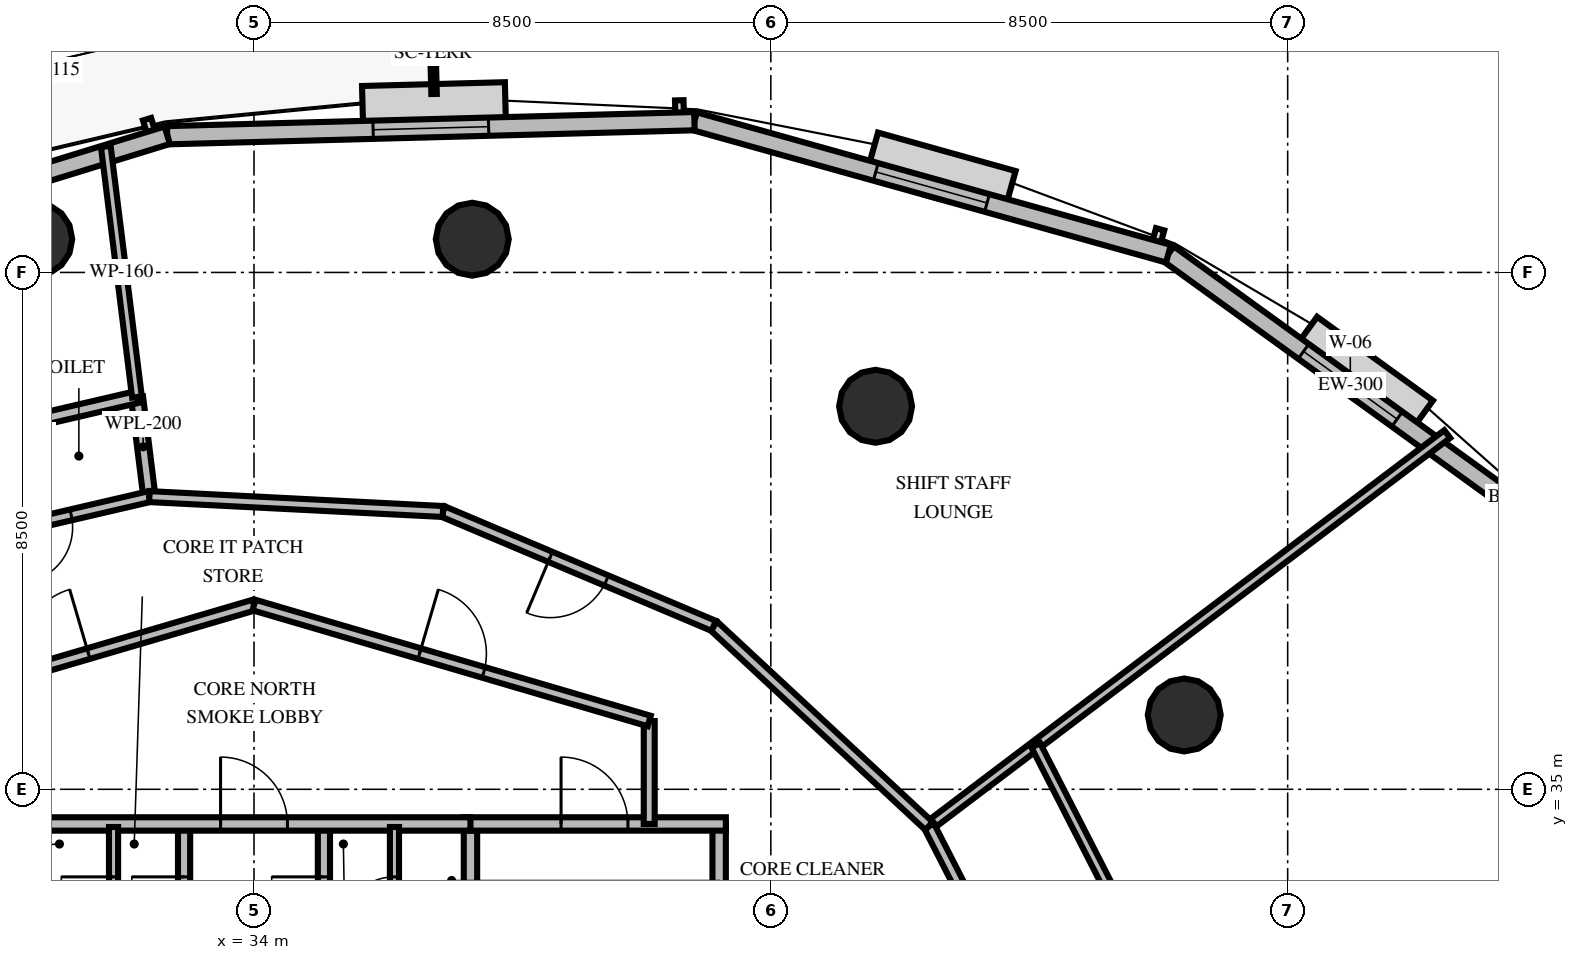
"""IFC4 building model, lengths in metres.
Left out: names, types, materials, properties, quantities, classifications, styles, units other than length and angle.
Written with IfcOpenShell. Run it as: python <this file> out.ifc"""

import sys

from ifc_helpers import new_model, si_unit, direction, frame, frame_2d, origin, origin_2d, place, context, subcontext, project, spatial, rectangle, circle, extrude, element, fill, save


model = new_model("IFC4")
c1 = context("Model", 3, precision=1e-05, world=origin(), true_north=direction((0.0, 1.0)))
c2 = subcontext(c1, "Body", "Model", "MODEL_VIEW")
j1 = project(units=[si_unit("LENGTHUNIT", "METRE"), si_unit("PLANEANGLEUNIT", "RADIAN")], contexts=[c1])
p1 = place(None, origin())
s1 = spatial("IfcSite", under=j1, at=p1, CompositionType="ELEMENT")
p2 = place(p1, origin())
s2 = spatial("IfcBuilding", under=s1, at=p2, CompositionType="ELEMENT")
p3 = place(p2, frame((0.0, 0.0, 105.8)))
s3 = spatial("IfcBuildingStorey", under=s2, at=p3, CompositionType="ELEMENT", Elevation=105.8)
for number, where, z_axis, x_axis in (
    (1, (49.299, 36.222, 0.0), (0.0, 0.0, 1.0), (1.0, 0.0, 0.0)),
    (2, (44.222, 41.299, 0.0), (0.0, 0.0, 1.0), (1.0, 0.0, 0.0)),
    (3, (37.59, 44.046, 0.0), (0.0, 0.0, 1.0), (1.0, 0.0, 0.0)),
    (4, (30.41, 44.046, 0.0), (0.0, 0.0, 1.0), (1.0, 0.0, 0.0)),
):
    element("IfcColumn", number, at=place(p3, frame(where, z_axis=z_axis, x_axis=x_axis)), inside=s3, PredefinedType="COLUMN", context=c2, shape_type="SweptSolid", body=[
        extrude(circle(Radius=0.6, at=origin_2d()), origin(), (0.0, 0.0, 1.0), 4.0),
    ])
p4 = place(p3, frame((55.021, 39.481, 0.0), z_axis=(0.0, 0.0, 1.0), x_axis=(-0.810233431566, 0.586107316431, 0.0)))
e5 = element("IfcWall", 5, at=p4, inside=s3, PredefinedType="SOLIDWALL", context=c2, shape_type="SweptSolid", body=[
    extrude(rectangle(XDim=7.383, YDim=0.3, at=frame_2d((3.692, 0.0))), origin(), (0.0, 0.0, 1.0), 2.9),
])
p5 = place(p4, frame((2.742, 0.0, 0.8)))
e6 = element("IfcOpeningElement", 6, at=p5, cuts=e5, PredefinedType="OPENING", context=c2, shape_type="SweptSolid", body=[
    extrude(rectangle(XDim=1.9, YDim=1.95, at=frame_2d((0.95, 0.975))), frame((0.0, 0.16, 0.0), z_axis=(0.0, -1.0, 0.0), x_axis=(1.0, 0.0, 0.0)), (0.0, 0.0, 1.0), 0.32),
])
p6 = place(p3, frame((49.039, 43.808, 0.0), z_axis=(0.0, 0.0, 1.0), x_axis=(-0.963083265721, 0.269203683645, 0.0)))
e7 = element("IfcWall", 7, at=p6, inside=s3, PredefinedType="SOLIDWALL", context=c2, shape_type="SweptSolid", body=[
    extrude(rectangle(XDim=8.095, YDim=0.3, at=frame_2d((4.047, 0.0))), origin(), (0.0, 0.0, 1.0), 2.9),
])
p7 = place(p6, frame((3.098, 0.0, 0.8)))
e8 = element("IfcOpeningElement", 8, at=p7, cuts=e7, PredefinedType="OPENING", context=c2, shape_type="SweptSolid", body=[
    extrude(rectangle(XDim=1.9, YDim=1.95, at=frame_2d((0.95, 0.975))), frame((0.0, 0.16, 0.0), z_axis=(0.0, -1.0, 0.0), x_axis=(1.0, 0.0, 0.0)), (0.0, 0.0, 1.0), 0.32),
])
p8 = place(p3, frame((41.243, 45.987, 0.0), z_axis=(0.0, 0.0, 1.0), x_axis=(-0.99964462396, -0.026657565299, 0.0)))
e9 = element("IfcWall", 9, at=p8, inside=s3, PredefinedType="SOLIDWALL", context=c2, shape_type="SweptSolid", body=[
    extrude(rectangle(XDim=8.673, YDim=0.3, at=frame_2d((4.336, 0.0))), origin(), (0.0, 0.0, 1.0), 2.9),
])
p9 = place(p8, frame((3.386, 0.0, 0.8)))
e10 = element("IfcOpeningElement", 10, at=p9, cuts=e9, PredefinedType="OPENING", context=c2, shape_type="SweptSolid", body=[
    extrude(rectangle(XDim=1.9, YDim=1.95, at=frame_2d((0.95, 0.975))), frame((0.0, 0.16, 0.0), z_axis=(0.0, -1.0, 0.0), x_axis=(1.0, 0.0, 0.0)), (0.0, 0.0, 1.0), 0.32),
])
p10 = place(p3, frame((32.573, 45.756, 0.0), z_axis=(0.0, 0.0, 1.0), x_axis=(-0.95579325701, -0.294039537911, 0.0)))
e11 = element("IfcWall", 11, at=p10, inside=s3, PredefinedType="SOLIDWALL", context=c2, shape_type="SweptSolid", body=[
    extrude(rectangle(XDim=8.891, YDim=0.3, at=frame_2d((4.445, 0.0))), origin(), (0.0, 0.0, 1.0), 2.9),
])
p11 = place(p10, frame((5.71, 0.0, 0.0)))
e12 = element("IfcOpeningElement", 12, at=p11, cuts=e11, PredefinedType="OPENING", context=c2, shape_type="SweptSolid", body=[
    extrude(rectangle(XDim=1.05, YDim=2.15, at=frame_2d((0.525, 1.075))), frame((0.0, 0.16, 0.0), z_axis=(0.0, -1.0, 0.0), x_axis=(1.0, 0.0, 0.0)), (0.0, 0.0, 1.0), 0.32),
])
p12 = place(p3, frame((32.85, 30.05, 0.0), z_axis=(0.0, 0.0, 1.0), x_axis=(0.0, 1.0, 0.0)))
e13 = element("IfcWall", 13, at=p12, inside=s3, PredefinedType="SOLIDWALL", context=c2, shape_type="SweptSolid", body=[
    extrude(rectangle(XDim=4.38, YDim=0.2, at=frame_2d((2.19, 0.0))), origin(), (0.0, 0.0, 1.0), 2.8),
])
p13 = place(p12, frame((2.65, 0.0, 0.0)))
e14 = element("IfcOpeningElement", 14, at=p13, cuts=e13, PredefinedType="OPENING", context=c2, shape_type="SweptSolid", body=[
    extrude(rectangle(XDim=0.86, YDim=2.05, at=frame_2d((0.43, 1.025))), frame((0.0, 0.11, 0.0), z_axis=(0.0, -1.0, 0.0), x_axis=(1.0, 0.0, 0.0)), (0.0, 0.0, 1.0), 0.22),
])
p14 = place(p3, frame((37.56, 30.05, 0.0), z_axis=(0.0, 0.0, 1.0), x_axis=(0.0, 1.0, 0.0)))
e15 = element("IfcWall", 15, at=p14, inside=s3, PredefinedType="SOLIDWALL", context=c2, shape_type="SweptSolid", body=[
    extrude(rectangle(XDim=4.38, YDim=0.22, at=frame_2d((2.19, 0.0))), origin(), (0.0, 0.0, 1.0), 2.8),
])
p15 = place(p14, frame((0.8, 0.0, 0.0)))
e16 = element("IfcOpeningElement", 16, at=p15, cuts=e15, PredefinedType="OPENING", context=c2, shape_type="SweptSolid", body=[
    extrude(rectangle(XDim=1.05, YDim=2.1, at=frame_2d((0.525, 1.05))), frame((0.0, 0.12, 0.0), z_axis=(0.0, -1.0, 0.0), x_axis=(1.0, 0.0, 0.0)), (0.0, 0.0, 1.0), 0.24),
])
p16 = place(p3, frame((41.65, 30.05, 0.0), z_axis=(0.0, 0.0, 1.0), x_axis=(0.0, 1.0, 0.0)))
e17 = element("IfcWall", 17, at=p16, inside=s3, PredefinedType="SOLIDWALL", context=c2, shape_type="SweptSolid", body=[
    extrude(rectangle(XDim=4.38, YDim=0.22, at=frame_2d((2.19, 0.0))), origin(), (0.0, 0.0, 1.0), 2.8),
])
p17 = place(p3, frame((37.45, 34.43, 0.0), z_axis=(0.0, 0.0, 1.0), x_axis=(1.0, 0.0, 0.0)))
e18 = element("IfcWall", 18, at=p17, inside=s3, PredefinedType="SOLIDWALL", context=c2, shape_type="SweptSolid", body=[
    extrude(rectangle(XDim=4.31, YDim=0.22, at=frame_2d((2.155, 0.0))), origin(), (0.0, 0.0, 1.0), 2.8),
])
p18 = place(p17, frame((1.6, 0.0, 0.0)))
e19 = element("IfcOpeningElement", 19, at=p18, cuts=e18, PredefinedType="OPENING", context=c2, shape_type="SweptSolid", body=[
    extrude(rectangle(XDim=1.1, YDim=2.15, at=frame_2d((0.55, 1.075))), frame((0.0, 0.12, 0.0), z_axis=(0.0, -1.0, 0.0), x_axis=(1.0, 0.0, 0.0)), (0.0, 0.0, 1.0), 0.24),
])
p19 = place(p3, frame((35.15, 30.05, 0.0), z_axis=(0.0, 0.0, 1.0), x_axis=(0.0, 1.0, 0.0)))
e20 = element("IfcWall", 20, at=p19, inside=s3, PredefinedType="SOLIDWALL", context=c2, shape_type="SweptSolid", body=[
    extrude(rectangle(XDim=4.38, YDim=0.2, at=frame_2d((2.19, 0.0))), origin(), (0.0, 0.0, 1.0), 2.8),
])
p20 = place(p19, frame((2.65, 0.0, 0.0)))
e21 = element("IfcOpeningElement", 21, at=p20, cuts=e20, PredefinedType="OPENING", context=c2, shape_type="SweptSolid", body=[
    extrude(rectangle(XDim=0.86, YDim=2.05, at=frame_2d((0.43, 1.025))), frame((0.0, 0.11, 0.0), z_axis=(0.0, -1.0, 0.0), x_axis=(1.0, 0.0, 0.0)), (0.0, 0.0, 1.0), 0.22),
])
p21 = place(p3, frame((30.44, 34.43, 0.0), z_axis=(0.0, 0.0, 1.0), x_axis=(1.0, 0.0, 0.0)))
e22 = element("IfcWall", 22, at=p21, inside=s3, PredefinedType="SOLIDWALL", context=c2, shape_type="SweptSolid", body=[
    extrude(rectangle(XDim=7.12, YDim=0.22, at=frame_2d((3.56, 0.0))), origin(), (0.0, 0.0, 1.0), 2.8),
])
p22 = place(p21, frame((3.01, 0.0, 0.0)))
e23 = element("IfcOpeningElement", 23, at=p22, cuts=e22, PredefinedType="OPENING", context=c2, shape_type="SweptSolid", body=[
    extrude(rectangle(XDim=1.1, YDim=2.15, at=frame_2d((0.55, 1.075))), frame((0.0, 0.12, 0.0), z_axis=(0.0, -1.0, 0.0), x_axis=(1.0, 0.0, 0.0)), (0.0, 0.0, 1.0), 0.24),
])
p23 = place(p3, frame((31.69, 32.05, 0.0), z_axis=(0.0, 0.0, 1.0), x_axis=(0.0, 1.0, 0.0)))
e24 = element("IfcWall", 24, at=p23, inside=s3, PredefinedType="PARTITIONING", context=c2, shape_type="SweptSolid", body=[
    extrude(rectangle(XDim=2.33, YDim=0.15, at=frame_2d((1.165, 0.0))), origin(), (0.0, 0.0, 1.0), 2.8),
])
p24 = place(p23, frame((0.65, 0.0, 0.0)))
e25 = element("IfcOpeningElement", 25, at=p24, cuts=e24, PredefinedType="OPENING", context=c2, shape_type="SweptSolid", body=[
    extrude(rectangle(XDim=0.86, YDim=2.05, at=frame_2d((0.43, 1.025))), frame((0.0, 0.085, 0.0), z_axis=(0.0, -1.0, 0.0), x_axis=(1.0, 0.0, 0.0)), (0.0, 0.0, 1.0), 0.17),
])
p25 = place(p3, frame((36.31, 32.05, 0.0), z_axis=(0.0, 0.0, 1.0), x_axis=(0.0, 1.0, 0.0)))
e26 = element("IfcWall", 26, at=p25, inside=s3, PredefinedType="PARTITIONING", context=c2, shape_type="SweptSolid", body=[
    extrude(rectangle(XDim=2.33, YDim=0.15, at=frame_2d((1.165, 0.0))), origin(), (0.0, 0.0, 1.0), 2.8),
])
p26 = place(p25, frame((0.65, 0.0, 0.0)))
e27 = element("IfcOpeningElement", 27, at=p26, cuts=e26, PredefinedType="OPENING", context=c2, shape_type="SweptSolid", body=[
    extrude(rectangle(XDim=0.86, YDim=2.05, at=frame_2d((0.43, 1.025))), frame((0.0, 0.085, 0.0), z_axis=(0.0, -1.0, 0.0), x_axis=(1.0, 0.0, 0.0)), (0.0, 0.0, 1.0), 0.17),
])
p27 = place(p3, frame((40.5, 36.123, 0.0), z_axis=(0.0, 0.0, 1.0), x_axis=(0.0, -1.0, 0.0)))
e28 = element("IfcWall", 28, at=p27, inside=s3, PredefinedType="PARTITIONING", context=c2, shape_type="SweptSolid", body=[
    extrude(rectangle(XDim=1.693, YDim=0.18, at=frame_2d((0.846, 0.0))), origin(), (0.0, 0.0, 1.0), 2.8),
])
p28 = place(p3, frame((27.5, 36.123, 0.0), z_axis=(0.0, 0.0, 1.0), x_axis=(0.959546654541, 0.281549671923, 0.0)))
e29 = element("IfcWall", 29, at=p28, inside=s3, PredefinedType="PARTITIONING", context=c2, shape_type="SweptSolid", body=[
    extrude(rectangle(XDim=6.774, YDim=0.18, at=frame_2d((3.387, 0.0))), origin(), (0.0, 0.0, 1.0), 2.8),
])
p29 = place(p28, frame((2.837, 0.0, 0.0)))
e30 = element("IfcOpeningElement", 30, at=p29, cuts=e29, PredefinedType="OPENING", context=c2, shape_type="SweptSolid", body=[
    extrude(rectangle(XDim=1.1, YDim=2.15, at=frame_2d((0.55, 1.075))), frame((0.0, 0.1, 0.0), z_axis=(0.0, -1.0, 0.0), x_axis=(1.0, 0.0, 0.0)), (0.0, 0.0, 1.0), 0.2),
])
p30 = place(p3, frame((34.0, 38.03, 0.0), z_axis=(0.0, 0.0, 1.0), x_axis=(0.959546654541, -0.281549671923, 0.0)))
e31 = element("IfcWall", 31, at=p30, inside=s3, PredefinedType="PARTITIONING", context=c2, shape_type="SweptSolid", body=[
    extrude(rectangle(XDim=6.774, YDim=0.18, at=frame_2d((3.387, 0.0))), origin(), (0.0, 0.0, 1.0), 2.8),
])
p31 = place(p30, frame((2.837, 0.0, 0.0)))
e32 = element("IfcOpeningElement", 32, at=p31, cuts=e31, PredefinedType="OPENING", context=c2, shape_type="SweptSolid", body=[
    extrude(rectangle(XDim=1.1, YDim=2.15, at=frame_2d((0.55, 1.075))), frame((0.0, 0.1, 0.0), z_axis=(0.0, -1.0, 0.0), x_axis=(1.0, 0.0, 0.0)), (0.0, 0.0, 1.0), 0.2),
])
p32 = place(p3, frame((32.28, 39.813, 0.0), z_axis=(0.0, 0.0, 1.0), x_axis=(-0.123688744547, 0.992321064209, 0.0)))
e33 = element("IfcWall", 33, at=p32, inside=s3, PredefinedType="PLUMBINGWALL", context=c2, shape_type="SweptSolid", body=[
    extrude(rectangle(XDim=1.65, YDim=0.2, at=frame_2d((0.825, 0.0))), origin(), (0.0, 0.0, 1.0), 2.8),
])
p33 = place(p3, frame((32.075, 41.451, 0.0), z_axis=(0.0, 0.0, 1.0), x_axis=(-0.973971068417, -0.22667235801, 0.0)))
e34 = element("IfcWall", 34, at=p33, inside=s3, PredefinedType="PLUMBINGWALL", context=c2, shape_type="SweptSolid", body=[
    extrude(rectangle(XDim=3.255, YDim=0.2, at=frame_2d((1.627, 0.0))), origin(), (0.0, 0.0, 1.0), 2.8),
])
p34 = place(p3, frame((32.28, 39.813, 0.0), z_axis=(0.0, 0.0, 1.0), x_axis=(-0.97398951497, -0.22659308182, 0.0)))
e35 = element("IfcWall", 35, at=p34, inside=s3, PredefinedType="PARTITIONING", context=c2, shape_type="SweptSolid", body=[
    extrude(rectangle(XDim=2.91, YDim=0.18, at=frame_2d((1.455, 0.0))), origin(), (0.0, 0.0, 1.0), 2.8),
])
p35 = place(p34, frame((1.321, 0.0, 0.0)))
e36 = element("IfcOpeningElement", 36, at=p35, cuts=e35, PredefinedType="OPENING", context=c2, shape_type="SweptSolid", body=[
    extrude(rectangle(XDim=0.92, YDim=2.1, at=frame_2d((0.46, 1.05))), frame((0.0, 0.1, 0.0), z_axis=(0.0, -1.0, 0.0), x_axis=(1.0, 0.0, 0.0)), (0.0, 0.0, 1.0), 0.2),
])
p36 = place(p3, frame((32.075, 41.451, 0.0), z_axis=(0.0, 0.0, 1.0), x_axis=(-0.123557239278, 0.992337446951, 0.0)))
e37 = element("IfcWall", 37, at=p36, inside=s3, PredefinedType="PARTITIONING", context=c2, shape_type="SweptSolid", body=[
    extrude(rectangle(XDim=4.153, YDim=0.16, at=frame_2d((2.077, 0.0))), origin(), (0.0, 0.0, 1.0), 2.8),
])
p37 = place(p3, frame((45.102, 34.397, 0.0), z_axis=(0.0, 0.0, 1.0), x_axis=(0.797580497371, 0.603212524914, 0.0)))
e38 = element("IfcWall", 38, at=p37, inside=s3, PredefinedType="PARTITIONING", context=c2, shape_type="SweptSolid", body=[
    extrude(rectangle(XDim=10.684, YDim=0.16, at=frame_2d((5.342, 0.0))), origin(), (0.0, 0.0, 1.0), 2.8),
])
p38 = place(p3, frame((47.305, 30.093, 0.0), z_axis=(0.0, 0.0, 1.0), x_axis=(-0.455556779265, 0.890206729286, 0.0)))
e39 = element("IfcWall", 39, at=p38, inside=s3, PredefinedType="PARTITIONING", context=c2, shape_type="SweptSolid", body=[
    extrude(rectangle(XDim=4.834, YDim=0.18, at=frame_2d((2.417, 0.0))), origin(), (0.0, 0.0, 1.0), 2.8),
])
p39 = place(p38, frame((1.034, 0.0, 0.0)))
e40 = element("IfcOpeningElement", 40, at=p39, cuts=e39, PredefinedType="OPENING", context=c2, shape_type="SweptSolid", body=[
    extrude(rectangle(XDim=1.0, YDim=2.15, at=frame_2d((0.5, 1.075))), frame((0.0, 0.1, 0.0), z_axis=(0.0, -1.0, 0.0), x_axis=(1.0, 0.0, 0.0)), (0.0, 0.0, 1.0), 0.2),
])
p40 = place(p3, frame((49.407, 30.74, 0.0), z_axis=(0.0, 0.0, 1.0), x_axis=(-0.455549750897, 0.890210325967, 0.0)))
e41 = element("IfcWall", 41, at=p40, inside=s3, PredefinedType="PARTITIONING", context=c2, shape_type="SweptSolid", body=[
    extrude(rectangle(XDim=5.598, YDim=0.16, at=frame_2d((2.799, 0.0))), origin(), (0.0, 0.0, 1.0), 2.8),
])
p41 = place(p40, frame((1.252, 0.0, 0.0)))
e42 = element("IfcOpeningElement", 42, at=p41, cuts=e41, PredefinedType="OPENING", context=c2, shape_type="SweptSolid", body=[
    extrude(rectangle(XDim=0.95, YDim=2.15, at=frame_2d((0.475, 1.075))), frame((0.0, 0.09, 0.0), z_axis=(0.0, -1.0, 0.0), x_axis=(1.0, 0.0, 0.0)), (0.0, 0.0, 1.0), 0.18),
])
p42 = place(p3, frame((45.102, 34.397, 0.0), z_axis=(0.0, 0.0, 1.0), x_axis=(-0.732539820955, 0.680724181086, 0.0)))
e43 = element("IfcWall", 43, at=p42, inside=s3, PredefinedType="PARTITIONING", context=c2, shape_type="SweptSolid", body=[
    extrude(rectangle(XDim=4.834, YDim=0.18, at=frame_2d((2.417, 0.0))), origin(), (0.0, 0.0, 1.0), 2.8),
])
p43 = place(p3, frame((41.561, 37.688, 0.0), z_axis=(0.0, 0.0, 1.0), x_axis=(-0.92119083755, 0.389111090583, 0.0)))
e44 = element("IfcWall", 44, at=p43, inside=s3, PredefinedType="PARTITIONING", context=c2, shape_type="SweptSolid", body=[
    extrude(rectangle(XDim=4.834, YDim=0.18, at=frame_2d((2.417, 0.0))), origin(), (0.0, 0.0, 1.0), 2.8),
])
p44 = place(p43, frame((1.917, 0.0, 0.0)))
e45 = element("IfcOpeningElement", 45, at=p44, cuts=e44, PredefinedType="OPENING", context=c2, shape_type="SweptSolid", body=[
    extrude(rectangle(XDim=1.0, YDim=2.15, at=frame_2d((0.5, 1.075))), frame((0.0, 0.1, 0.0), z_axis=(0.0, -1.0, 0.0), x_axis=(1.0, 0.0, 0.0)), (0.0, 0.0, 1.0), 0.2),
])
p45 = place(p3, frame((37.108, 39.569, 0.0), z_axis=(0.0, 0.0, 1.0), x_axis=(-0.998718869606, 0.050602564085, 0.0)))
e46 = element("IfcWall", 46, at=p45, inside=s3, PredefinedType="PARTITIONING", context=c2, shape_type="SweptSolid", body=[
    extrude(rectangle(XDim=4.834, YDim=0.18, at=frame_2d((2.417, 0.0))), origin(), (0.0, 0.0, 1.0), 2.8),
])
p46 = place(p5, origin())
e47 = element("IfcWindow", 47, at=p46, inside=s3, PartitioningType="SINGLE_PANEL", PredefinedType="WINDOW", context=c2, shape_type="SweptSolid", body=[
    extrude(rectangle(XDim=1.9, YDim=1.95, at=frame_2d((0.95, 0.975))), frame((0.0, 0.03, 0.0), z_axis=(0.0, -1.0, 0.0), x_axis=(1.0, 0.0, 0.0)), (0.0, 0.0, 1.0), 0.06),
])
fill(e6, e47)
p47 = place(p7, origin())
e48 = element("IfcWindow", 48, at=p47, inside=s3, PartitioningType="SINGLE_PANEL", PredefinedType="WINDOW", context=c2, shape_type="SweptSolid", body=[
    extrude(rectangle(XDim=1.9, YDim=1.95, at=frame_2d((0.95, 0.975))), frame((0.0, 0.03, 0.0), z_axis=(0.0, -1.0, 0.0), x_axis=(1.0, 0.0, 0.0)), (0.0, 0.0, 1.0), 0.06),
])
fill(e8, e48)
p48 = place(p9, origin())
e49 = element("IfcWindow", 49, at=p48, inside=s3, PartitioningType="SINGLE_PANEL", PredefinedType="WINDOW", context=c2, shape_type="SweptSolid", body=[
    extrude(rectangle(XDim=1.9, YDim=1.95, at=frame_2d((0.95, 0.975))), frame((0.0, 0.03, 0.0), z_axis=(0.0, -1.0, 0.0), x_axis=(1.0, 0.0, 0.0)), (0.0, 0.0, 1.0), 0.06),
])
fill(e10, e49)
p49 = place(p13, origin())
e50 = element("IfcDoor", 50, at=p49, inside=s3, OperationType="SINGLE_SWING_RIGHT", PredefinedType="TRAPDOOR", context=c2, shape_type="SweptSolid", body=[
    extrude(rectangle(XDim=0.86, YDim=2.05, at=frame_2d((0.43, 1.025))), frame((0.0, 0.025, 0.0), z_axis=(0.0, -1.0, 0.0), x_axis=(1.0, 0.0, 0.0)), (0.0, 0.0, 1.0), 0.05),
])
fill(e14, e50)
p50 = place(p18, origin())
e51 = element("IfcDoor", 51, at=p50, inside=s3, OperationType="SINGLE_SWING_LEFT", PredefinedType="DOOR", context=c2, shape_type="SweptSolid", body=[
    extrude(rectangle(XDim=1.1, YDim=2.15, at=frame_2d((0.55, 1.075))), frame((0.0, 0.025, 0.0), z_axis=(0.0, -1.0, 0.0), x_axis=(1.0, 0.0, 0.0)), (0.0, 0.0, 1.0), 0.05),
])
fill(e19, e51)
p51 = place(p20, origin())
e52 = element("IfcDoor", 52, at=p51, inside=s3, OperationType="SINGLE_SWING_RIGHT", PredefinedType="TRAPDOOR", context=c2, shape_type="SweptSolid", body=[
    extrude(rectangle(XDim=0.86, YDim=2.05, at=frame_2d((0.43, 1.025))), frame((0.0, 0.025, 0.0), z_axis=(0.0, -1.0, 0.0), x_axis=(1.0, 0.0, 0.0)), (0.0, 0.0, 1.0), 0.05),
])
fill(e21, e52)
p52 = place(p22, origin())
e53 = element("IfcDoor", 53, at=p52, inside=s3, OperationType="SINGLE_SWING_LEFT", PredefinedType="DOOR", context=c2, shape_type="SweptSolid", body=[
    extrude(rectangle(XDim=1.1, YDim=2.15, at=frame_2d((0.55, 1.075))), frame((0.0, 0.025, 0.0), z_axis=(0.0, -1.0, 0.0), x_axis=(1.0, 0.0, 0.0)), (0.0, 0.0, 1.0), 0.05),
])
fill(e23, e53)
p53 = place(p24, origin())
e54 = element("IfcDoor", 54, at=p53, inside=s3, OperationType="SINGLE_SWING_RIGHT", PredefinedType="TRAPDOOR", context=c2, shape_type="SweptSolid", body=[
    extrude(rectangle(XDim=0.86, YDim=2.05, at=frame_2d((0.43, 1.025))), frame((0.0, 0.025, 0.0), z_axis=(0.0, -1.0, 0.0), x_axis=(1.0, 0.0, 0.0)), (0.0, 0.0, 1.0), 0.05),
])
fill(e25, e54)
p54 = place(p26, origin())
e55 = element("IfcDoor", 55, at=p54, inside=s3, OperationType="SINGLE_SWING_LEFT", PredefinedType="TRAPDOOR", context=c2, shape_type="SweptSolid", body=[
    extrude(rectangle(XDim=0.86, YDim=2.05, at=frame_2d((0.43, 1.025))), frame((0.0, 0.025, 0.0), z_axis=(0.0, -1.0, 0.0), x_axis=(1.0, 0.0, 0.0)), (0.0, 0.0, 1.0), 0.05),
])
fill(e27, e55)
p55 = place(p29, origin())
e56 = element("IfcDoor", 56, at=p55, inside=s3, OperationType="SINGLE_SWING_RIGHT", PredefinedType="DOOR", context=c2, shape_type="SweptSolid", body=[
    extrude(rectangle(XDim=1.1, YDim=2.15, at=frame_2d((0.55, 1.075))), frame((0.0, 0.025, 0.0), z_axis=(0.0, -1.0, 0.0), x_axis=(1.0, 0.0, 0.0)), (0.0, 0.0, 1.0), 0.05),
])
fill(e30, e56)
p56 = place(p31, origin())
e57 = element("IfcDoor", 57, at=p56, inside=s3, OperationType="SINGLE_SWING_LEFT", PredefinedType="DOOR", context=c2, shape_type="SweptSolid", body=[
    extrude(rectangle(XDim=1.1, YDim=2.15, at=frame_2d((0.55, 1.075))), frame((0.0, 0.025, 0.0), z_axis=(0.0, -1.0, 0.0), x_axis=(1.0, 0.0, 0.0)), (0.0, 0.0, 1.0), 0.05),
])
fill(e32, e57)
p57 = place(p35, origin())
e58 = element("IfcDoor", 58, at=p57, inside=s3, OperationType="SINGLE_SWING_RIGHT", PredefinedType="DOOR", context=c2, shape_type="SweptSolid", body=[
    extrude(rectangle(XDim=0.92, YDim=2.1, at=frame_2d((0.46, 1.05))), frame((0.0, 0.025, 0.0), z_axis=(0.0, -1.0, 0.0), x_axis=(1.0, 0.0, 0.0)), (0.0, 0.0, 1.0), 0.05),
])
fill(e36, e58)
p58 = place(p44, origin())
e59 = element("IfcDoor", 59, at=p58, inside=s3, OperationType="SINGLE_SWING_RIGHT", PredefinedType="DOOR", context=c2, shape_type="SweptSolid", body=[
    extrude(rectangle(XDim=1.0, YDim=2.15, at=frame_2d((0.5, 1.075))), frame((0.0, 0.025, 0.0), z_axis=(0.0, -1.0, 0.0), x_axis=(1.0, 0.0, 0.0)), (0.0, 0.0, 1.0), 0.05),
])
fill(e45, e59)
save(model, sys.argv[1])
